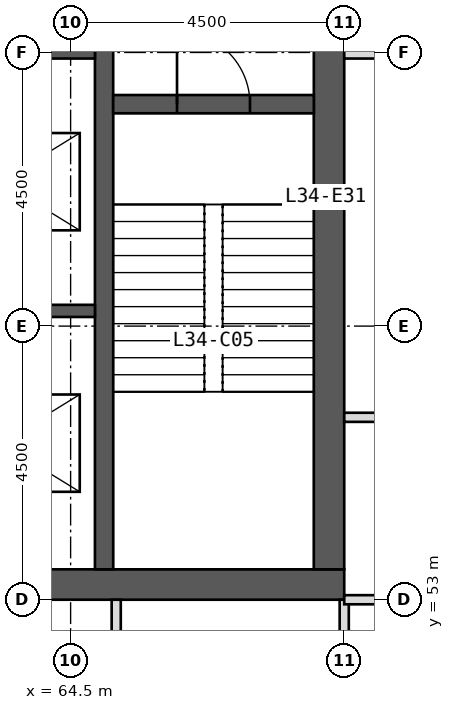
"""IFC4 building model, lengths in metres.
Left out: names, types, materials, properties, quantities, classifications, styles, units other than length and angle.
Written with IfcOpenShell. Run it as: python <this file> out.ifc"""

import sys

from ifc_helpers import new_model, si_unit, direction, frame, frame_2d, origin, place, context, subcontext, project, spatial, rectangle, extrude, element, fill, save


model = new_model("IFC4")
c1 = context("Model", 3, precision=1e-05, world=origin(), true_north=direction((0.0, 1.0)))
c2 = subcontext(c1, "Body", "Model", "MODEL_VIEW")
j1 = project(units=[si_unit("LENGTHUNIT", "METRE"), si_unit("PLANEANGLEUNIT", "RADIAN")], contexts=[c1])
p1 = place(None, origin())
s1 = spatial("IfcSite", under=j1, at=p1, CompositionType="ELEMENT")
p2 = place(p1, origin())
s2 = spatial("IfcBuilding", under=s1, at=p2, CompositionType="ELEMENT")
p3 = place(p2, frame((0.0, 0.0, 144.0)))
s3 = spatial("IfcBuildingStorey", under=s2, at=p3, CompositionType="ELEMENT", Elevation=144.0)
p4 = place(p3, frame((51.0, 53.25, 0.0), z_axis=(0.0, 0.0, 1.0), x_axis=(1.0, 0.0, 0.0)))
e1 = element("IfcWall", 1, at=p4, inside=s3, PredefinedType="SHEAR", context=c2, shape_type="SweptSolid", body=[
    extrude(rectangle(XDim=18.0, YDim=0.5, at=frame_2d((9.0, 0.0))), origin(), (0.0, 0.0, 1.0), 4.0),
])
p5 = place(p4, frame((8.1, 0.0, 0.0)))
e2 = element("IfcOpeningElement", 2, at=p5, cuts=e1, PredefinedType="OPENING", context=c2, shape_type="SweptSolid", body=[
    extrude(rectangle(XDim=1.8, YDim=2.2, at=frame_2d((0.9, 1.1))), frame((0.0, 0.26, 0.0), z_axis=(0.0, -1.0, 0.0), x_axis=(1.0, 0.0, 0.0)), (0.0, 0.0, 1.0), 0.52),
])
p6 = place(p3, frame((68.75, 53.5, 0.0), z_axis=(0.0, 0.0, 1.0), x_axis=(0.0, 1.0, 0.0)))
e3 = element("IfcWall", 3, at=p6, inside=s3, PredefinedType="SHEAR", context=c2, shape_type="SweptSolid", body=[
    extrude(rectangle(XDim=17.0, YDim=0.5, at=frame_2d((8.5, 0.0))), origin(), (0.0, 0.0, 1.0), 4.0),
])
p7 = place(p6, frame((9.5, 0.0, 0.0)))
e4 = element("IfcOpeningElement", 4, at=p7, cuts=e3, PredefinedType="OPENING", context=c2, shape_type="SweptSolid", body=[
    extrude(rectangle(XDim=1.5, YDim=2.2, at=frame_2d((0.75, 1.1))), frame((0.0, 0.26, 0.0), z_axis=(0.0, -1.0, 0.0), x_axis=(1.0, 0.0, 0.0)), (0.0, 0.0, 1.0), 0.52),
])
p8 = place(p3, frame((65.05, 53.5, 0.0), z_axis=(0.0, 0.0, 1.0), x_axis=(0.0, 1.0, 0.0)))
e5 = element("IfcWall", 5, at=p8, inside=s3, PredefinedType="SHEAR", context=c2, shape_type="SweptSolid", body=[
    extrude(rectangle(XDim=17.0, YDim=0.3, at=frame_2d((8.5, 0.0))), origin(), (0.0, 0.0, 1.0), 4.0),
])
for number, where, z_axis, x_axis in (
    (6, (61.85, 57.75, 0.0), (0.0, 0.0, 1.0), (1.0, 0.0, 0.0)),
    (7, (61.85, 62.0, 0.0), (0.0, 0.0, 1.0), (1.0, 0.0, 0.0)),
):
    element("IfcWall", number, at=place(p3, frame(where, z_axis=z_axis, x_axis=x_axis)), inside=s3, PredefinedType="SHEAR", context=c2, shape_type="SweptSolid", body=[
        extrude(rectangle(XDim=3.05, YDim=0.2, at=frame_2d((1.525, 0.0))), origin(), (0.0, 0.0, 1.0), 4.0),
    ])
p9 = place(p3, frame((65.2, 61.15, 0.0), z_axis=(0.0, 0.0, 1.0), x_axis=(1.0, 0.0, 0.0)))
e8 = element("IfcWall", 8, at=p9, inside=s3, PredefinedType="SHEAR", context=c2, shape_type="SweptSolid", body=[
    extrude(rectangle(XDim=3.3, YDim=0.3, at=frame_2d((1.65, 0.0))), origin(), (0.0, 0.0, 1.0), 4.0),
])
p10 = place(p9, frame((1.05, 0.0, 0.0)))
e9 = element("IfcOpeningElement", 9, at=p10, cuts=e8, PredefinedType="OPENING", context=c2, shape_type="SweptSolid", body=[
    extrude(rectangle(XDim=1.2, YDim=2.1, at=frame_2d((0.6, 1.05))), frame((0.0, 0.16, 0.0), z_axis=(0.0, -1.0, 0.0), x_axis=(1.0, 0.0, 0.0)), (0.0, 0.0, 1.0), 0.32),
])
p11 = place(p3, frame((69.0, 53.0, 0.0), z_axis=(0.0, 0.0, 1.0), x_axis=(0.0, -1.0, 0.0)))
e10 = element("IfcWall", 10, at=p11, inside=s3, PredefinedType="PARTITIONING", context=c2, shape_type="SweptSolid", body=[
    extrude(rectangle(XDim=6.6, YDim=0.15, at=frame_2d((3.3, 0.0))), origin(), (0.0, 0.0, 1.0), 3.75),
])
p12 = place(p3, frame((65.25, 53.0, 0.0), z_axis=(0.0, 0.0, 1.0), x_axis=(0.0, -1.0, 0.0)))
e11 = element("IfcWall", 11, at=p12, inside=s3, PredefinedType="PARTITIONING", context=c2, shape_type="SweptSolid", body=[
    extrude(rectangle(XDim=2.4, YDim=0.15, at=frame_2d((1.2, 0.0))), origin(), (0.0, 0.0, 1.0), 3.75),
])
p13 = place(p3, frame((69.0, 62.0, 0.0), z_axis=(0.0, 0.0, 1.0), x_axis=(1.0, 0.0, 0.0)))
e12 = element("IfcWall", 12, at=p13, inside=s3, PredefinedType="SOLIDWALL", context=c2, shape_type="SweptSolid", body=[
    extrude(rectangle(XDim=6.6, YDim=0.2, at=frame_2d((3.3, 0.0))), origin(), (0.0, 0.0, 1.0), 2.95),
])
for number, where, z_axis, x_axis in (
    (13, (69.0, 56.0, 0.0), (0.0, 0.0, 1.0), (1.0, 0.0, 0.0)),
    (14, (69.0, 53.0, 0.0), (0.0, 0.0, 1.0), (1.0, 0.0, 0.0)),
):
    element("IfcWall", number, at=place(p3, frame(where, z_axis=z_axis, x_axis=x_axis)), inside=s3, PredefinedType="PARTITIONING", context=c2, shape_type="SweptSolid", body=[
        extrude(rectangle(XDim=6.6, YDim=0.15, at=frame_2d((3.3, 0.0))), origin(), (0.0, 0.0, 1.0), 3.75),
    ])
p14 = place(p10, origin())
e15 = element("IfcDoor", 15, at=p14, inside=s3, OperationType="SINGLE_SWING_LEFT", PredefinedType="DOOR", context=c2, shape_type="SweptSolid", body=[
    extrude(rectangle(XDim=1.2, YDim=2.1, at=frame_2d((0.6, 1.05))), frame((0.0, 0.025, 0.0), z_axis=(0.0, -1.0, 0.0), x_axis=(1.0, 0.0, 0.0)), (0.0, 0.0, 1.0), 0.05),
])
fill(e9, e15)
save(model, sys.argv[1])
